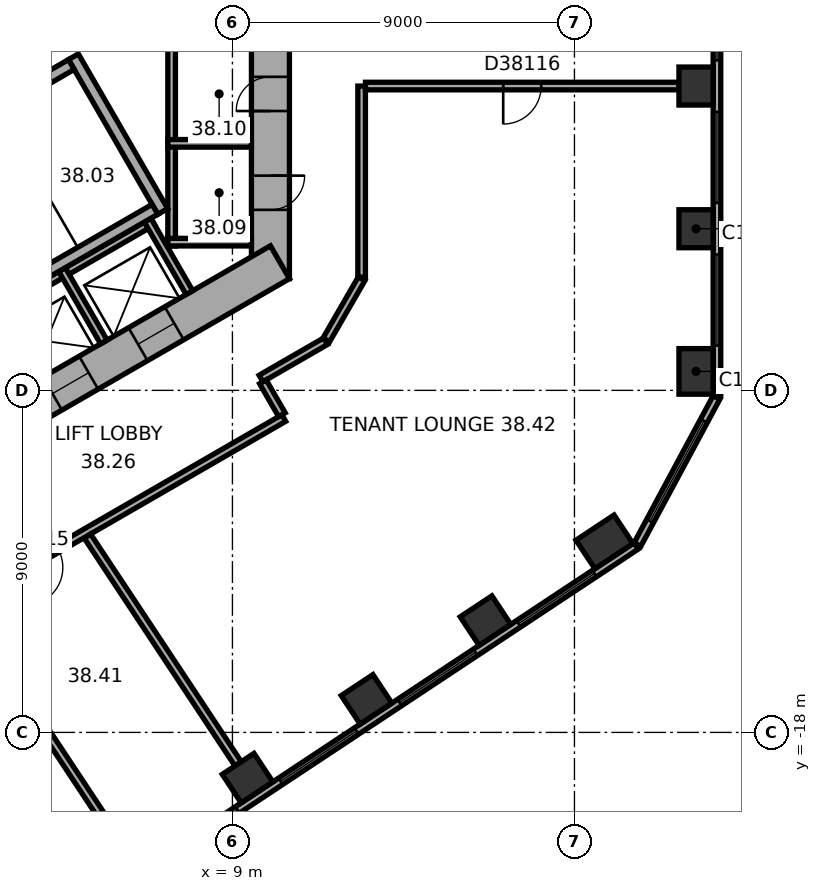
"""IFC4 building model, lengths in metres.
Left out: names, types, materials, properties, quantities, classifications, styles, units other than length and angle.
Written with IfcOpenShell. Run it as: python <this file> out.ifc"""

import sys

from ifc_helpers import new_model, si_unit, direction, frame, frame_2d, origin, origin_2d, place, context, subcontext, project, spatial, rectangle, extrude, element, fill, save


model = new_model("IFC4")
c1 = context("Model", 3, precision=1e-05, world=origin(), true_north=direction((0.0, 1.0)))
c2 = subcontext(c1, "Body", "Model", "MODEL_VIEW")
j1 = project(units=[si_unit("LENGTHUNIT", "METRE"), si_unit("PLANEANGLEUNIT", "RADIAN")], contexts=[c1])
p1 = place(None, origin())
s1 = spatial("IfcSite", under=j1, at=p1, CompositionType="ELEMENT")
p2 = place(p1, origin())
s2 = spatial("IfcBuilding", under=s1, at=p2, CompositionType="ELEMENT")
p3 = place(p2, frame((0.0, 0.0, 157.7)))
s3 = spatial("IfcBuildingStorey", under=s2, at=p3, CompositionType="ELEMENT", Elevation=157.7)
p4 = place(p3, frame((21.2, -8.501, 0.0), z_axis=(0.0, 0.0, 1.0), x_axis=(0.0, 1.0, 0.0)))
e1 = element("IfcColumn", 1, at=p4, inside=s3, PredefinedType="COLUMN", context=c2, shape_type="SweptSolid", body=[
    extrude(rectangle(XDim=1.2, YDim=0.9, at=origin_2d()), origin(), (0.0, 0.0, 1.0), 3.7),
])
for number, where, z_axis, x_axis in (
    (2, (21.2, -4.747, 0.0), (0.0, 0.0, 1.0), (0.0, 1.0, 0.0)),
    (3, (21.2, -0.993, 0.0), (0.0, 0.0, 1.0), (0.0, 1.0, 0.0)),
    (4, (9.398, -19.202, 0.0), (0.0, 0.0, 1.0), (0.834, 0.552, 0.0)),
    (5, (12.529, -17.13, 0.0), (0.0, 0.0, 1.0), (0.834, 0.552, 0.0)),
    (6, (15.659, -15.058, 0.0), (0.0, 0.0, 1.0), (0.834, 0.552, 0.0)),
):
    element("IfcColumn", number, at=place(p3, frame(where, z_axis=z_axis, x_axis=x_axis)), inside=s3, PredefinedType="COLUMN", context=c2, shape_type="SweptSolid", body=[
        extrude(rectangle(XDim=1.0, YDim=0.9, at=origin_2d()), origin(), (0.0, 0.0, 1.0), 3.7),
    ])
p5 = place(p3, frame((18.79, -12.986, 0.0), z_axis=(0.0, 0.0, 1.0), x_axis=(0.833885822067, 0.551936985312, 0.0)))
e7 = element("IfcColumn", 7, at=p5, inside=s3, PredefinedType="COLUMN", context=c2, shape_type="SweptSolid", body=[
    extrude(rectangle(XDim=1.2, YDim=0.9, at=origin_2d()), origin(), (0.0, 0.0, 1.0), 3.7),
])
p6 = place(p3, frame((10.0, -6.062, 0.0), z_axis=(0.0, 0.0, 1.0), x_axis=(0.0, 1.0, 0.0)))
e8 = element("IfcWall", 8, at=p6, inside=s3, PredefinedType="SHEAR", context=c2, shape_type="SweptSolid", body=[
    extrude(rectangle(XDim=12.125, YDim=1.0, at=frame_2d((6.062, 0.0))), origin(), (0.0, 0.0, 1.0), 3.7),
])
p7 = place(p6, frame((6.262, 0.0, 0.0)))
e9 = element("IfcOpeningElement", 9, at=p7, cuts=e8, PredefinedType="OPENING", context=c2, shape_type="SweptSolid", body=[
    extrude(rectangle(XDim=1.5, YDim=2.1, at=frame_2d((0.75, 1.05))), frame((0.0, 0.51, 0.0), z_axis=(0.0, -1.0, 0.0), x_axis=(1.0, 0.0, 0.0)), (0.0, 0.0, 1.0), 1.02),
])
p8 = place(p6, frame((1.812, 0.0, 0.0)))
e10 = element("IfcOpeningElement", 10, at=p8, cuts=e8, PredefinedType="OPENING", context=c2, shape_type="SweptSolid", body=[
    extrude(rectangle(XDim=0.9, YDim=2.1, at=frame_2d((0.45, 1.05))), frame((0.0, 0.51, 0.0), z_axis=(0.0, -1.0, 0.0), x_axis=(1.0, 0.0, 0.0)), (0.0, 0.0, 1.0), 1.02),
])
p9 = place(p6, frame((4.412, 0.0, 0.0)))
e11 = element("IfcOpeningElement", 11, at=p9, cuts=e8, PredefinedType="OPENING", context=c2, shape_type="SweptSolid", body=[
    extrude(rectangle(XDim=0.9, YDim=2.1, at=frame_2d((0.45, 1.05))), frame((0.0, 0.51, 0.0), z_axis=(0.0, -1.0, 0.0), x_axis=(1.0, 0.0, 0.0)), (0.0, 0.0, 1.0), 1.02),
])
p10 = place(p3, frame((-0.25, -11.691, 0.0), z_axis=(0.0, 0.0, 1.0), x_axis=(0.866022616891, 0.50000482701, 0.0)))
e12 = element("IfcWall", 12, at=p10, inside=s3, PredefinedType="SHEAR", context=c2, shape_type="SweptSolid", body=[
    extrude(rectangle(XDim=12.125, YDim=1.0, at=frame_2d((6.062, 0.0))), origin(), (0.0, 0.0, 1.0), 3.7),
])
p11 = place(p10, frame((2.612, 0.0, 0.0)))
e13 = element("IfcOpeningElement", 13, at=p11, cuts=e12, PredefinedType="OPENING", context=c2, shape_type="SweptSolid", body=[
    extrude(rectangle(XDim=1.1, YDim=2.1, at=frame_2d((0.55, 1.05))), frame((0.0, 0.51, 0.0), z_axis=(0.0, -1.0, 0.0), x_axis=(1.0, 0.0, 0.0)), (0.0, 0.0, 1.0), 1.02),
])
p12 = place(p10, frame((5.212, 0.0, 0.0)))
e14 = element("IfcOpeningElement", 14, at=p12, cuts=e12, PredefinedType="OPENING", context=c2, shape_type="SweptSolid", body=[
    extrude(rectangle(XDim=1.1, YDim=2.1, at=frame_2d((0.55, 1.05))), frame((0.0, 0.51, 0.0), z_axis=(0.0, -1.0, 0.0), x_axis=(1.0, 0.0, 0.0)), (0.0, 0.0, 1.0), 1.02),
])
p13 = place(p10, frame((7.812, 0.0, 0.0)))
e15 = element("IfcOpeningElement", 15, at=p13, cuts=e12, PredefinedType="OPENING", context=c2, shape_type="SweptSolid", body=[
    extrude(rectangle(XDim=1.1, YDim=2.1, at=frame_2d((0.55, 1.05))), frame((0.0, 0.51, 0.0), z_axis=(0.0, -1.0, 0.0), x_axis=(1.0, 0.0, 0.0)), (0.0, 0.0, 1.0), 1.02),
])
p14 = place(p3, frame((21.75, -9.138, 0.0), z_axis=(0.0, 0.0, 1.0), x_axis=(0.0, 1.0, 0.0)))
e16 = element("IfcWall", 16, at=p14, inside=s3, PredefinedType="STANDARD", context=c2, shape_type="SweptSolid", body=[
    extrude(rectangle(XDim=20.044, YDim=0.2, at=frame_2d((10.022, 0.0))), origin(), (0.0, 0.0, 1.0), 3.7),
])
p15 = place(p14, frame((1.314, 0.0, 0.9)))
e17 = element("IfcOpeningElement", 17, at=p15, cuts=e16, PredefinedType="OPENING", context=c2, shape_type="SweptSolid", body=[
    extrude(rectangle(XDim=2.4, YDim=2.0, at=frame_2d((1.2, 1.0))), frame((0.0, 0.11, 0.0), z_axis=(0.0, -1.0, 0.0), x_axis=(1.0, 0.0, 0.0)), (0.0, 0.0, 1.0), 0.22),
])
p16 = place(p14, frame((5.069, 0.0, 0.9)))
e18 = element("IfcOpeningElement", 18, at=p16, cuts=e16, PredefinedType="OPENING", context=c2, shape_type="SweptSolid", body=[
    extrude(rectangle(XDim=2.4, YDim=2.0, at=frame_2d((1.2, 1.0))), frame((0.0, 0.11, 0.0), z_axis=(0.0, -1.0, 0.0), x_axis=(1.0, 0.0, 0.0)), (0.0, 0.0, 1.0), 0.22),
])
p17 = place(p14, frame((8.823, 0.0, 0.9)))
e19 = element("IfcOpeningElement", 19, at=p17, cuts=e16, PredefinedType="OPENING", context=c2, shape_type="SweptSolid", body=[
    extrude(rectangle(XDim=2.4, YDim=2.0, at=frame_2d((1.2, 1.0))), frame((0.0, 0.11, 0.0), z_axis=(0.0, -1.0, 0.0), x_axis=(1.0, 0.0, 0.0)), (0.0, 0.0, 1.0), 0.22),
])
p18 = place(p14, frame((12.577, 0.0, 0.9)))
e20 = element("IfcOpeningElement", 20, at=p18, cuts=e16, PredefinedType="OPENING", context=c2, shape_type="SweptSolid", body=[
    extrude(rectangle(XDim=2.4, YDim=2.0, at=frame_2d((1.2, 1.0))), frame((0.0, 0.11, 0.0), z_axis=(0.0, -1.0, 0.0), x_axis=(1.0, 0.0, 0.0)), (0.0, 0.0, 1.0), 0.22),
])
p19 = place(p14, frame((16.331, 0.0, 0.9)))
e21 = element("IfcOpeningElement", 21, at=p19, cuts=e16, PredefinedType="OPENING", context=c2, shape_type="SweptSolid", body=[
    extrude(rectangle(XDim=2.4, YDim=2.0, at=frame_2d((1.2, 1.0))), frame((0.0, 0.11, 0.0), z_axis=(0.0, -1.0, 0.0), x_axis=(1.0, 0.0, 0.0)), (0.0, 0.0, 1.0), 0.22),
])
p20 = place(p3, frame((2.911, -24.156, 0.0), z_axis=(0.0, 0.0, 1.0), x_axis=(0.833882163564, 0.551942512668, 0.0)))
e22 = element("IfcWall", 22, at=p20, inside=s3, PredefinedType="STANDARD", context=c2, shape_type="SweptSolid", body=[
    extrude(rectangle(XDim=20.044, YDim=0.2, at=frame_2d((10.022, 0.0))), origin(), (0.0, 0.0, 1.0), 3.7),
])
p21 = place(p20, frame((1.313, 0.0, 0.9)))
e23 = element("IfcOpeningElement", 23, at=p21, cuts=e22, PredefinedType="OPENING", context=c2, shape_type="SweptSolid", body=[
    extrude(rectangle(XDim=2.4, YDim=2.0, at=frame_2d((1.2, 1.0))), frame((0.0, 0.11, 0.0), z_axis=(0.0, -1.0, 0.0), x_axis=(1.0, 0.0, 0.0)), (0.0, 0.0, 1.0), 0.22),
])
p22 = place(p20, frame((5.067, 0.0, 0.9)))
e24 = element("IfcOpeningElement", 24, at=p22, cuts=e22, PredefinedType="OPENING", context=c2, shape_type="SweptSolid", body=[
    extrude(rectangle(XDim=2.4, YDim=2.0, at=frame_2d((1.2, 1.0))), frame((0.0, 0.11, 0.0), z_axis=(0.0, -1.0, 0.0), x_axis=(1.0, 0.0, 0.0)), (0.0, 0.0, 1.0), 0.22),
])
p23 = place(p20, frame((8.821, 0.0, 0.9)))
e25 = element("IfcOpeningElement", 25, at=p23, cuts=e22, PredefinedType="OPENING", context=c2, shape_type="SweptSolid", body=[
    extrude(rectangle(XDim=2.4, YDim=2.0, at=frame_2d((1.2, 1.0))), frame((0.0, 0.11, 0.0), z_axis=(0.0, -1.0, 0.0), x_axis=(1.0, 0.0, 0.0)), (0.0, 0.0, 1.0), 0.22),
])
p24 = place(p20, frame((12.575, 0.0, 0.9)))
e26 = element("IfcOpeningElement", 26, at=p24, cuts=e22, PredefinedType="OPENING", context=c2, shape_type="SweptSolid", body=[
    extrude(rectangle(XDim=2.4, YDim=2.0, at=frame_2d((1.2, 1.0))), frame((0.0, 0.11, 0.0), z_axis=(0.0, -1.0, 0.0), x_axis=(1.0, 0.0, 0.0)), (0.0, 0.0, 1.0), 0.22),
])
p25 = place(p20, frame((16.329, 0.0, 0.9)))
e27 = element("IfcOpeningElement", 27, at=p25, cuts=e22, PredefinedType="OPENING", context=c2, shape_type="SweptSolid", body=[
    extrude(rectangle(XDim=2.4, YDim=2.0, at=frame_2d((1.2, 1.0))), frame((0.0, 0.11, 0.0), z_axis=(0.0, -1.0, 0.0), x_axis=(1.0, 0.0, 0.0)), (0.0, 0.0, 1.0), 0.22),
])
p26 = place(p3, frame((19.658, -13.057, 0.0), z_axis=(0.0, 0.0, 1.0), x_axis=(0.473307879841, 0.880897071672, 0.0)))
e28 = element("IfcWall", 28, at=p26, inside=s3, PredefinedType="STANDARD", context=c2, shape_type="SweptSolid", body=[
    extrude(rectangle(XDim=4.395, YDim=0.2, at=frame_2d((2.197, 0.0))), origin(), (0.0, 0.0, 1.0), 3.7),
])
p27 = place(p26, frame((0.698, 0.0, 0.9)))
e29 = element("IfcOpeningElement", 29, at=p27, cuts=e28, PredefinedType="OPENING", context=c2, shape_type="SweptSolid", body=[
    extrude(rectangle(XDim=3.0, YDim=2.0, at=frame_2d((1.5, 1.0))), frame((0.0, 0.11, 0.0), z_axis=(0.0, -1.0, 0.0), x_axis=(1.0, 0.0, 0.0)), (0.0, 0.0, 1.0), 0.22),
])
p28 = place(p3, frame((7.4, -5.2, 0.0), z_axis=(0.0, 0.0, 1.0), x_axis=(0.0, 1.0, 0.0)))
e30 = element("IfcWall", 30, at=p28, inside=s3, PredefinedType="PARTITIONING", context=c2, shape_type="SweptSolid", body=[
    extrude(rectangle(XDim=5.4, YDim=0.2, at=frame_2d((2.7, 0.0))), origin(), (0.0, 0.0, 1.0), 3.42),
])
for number, where, z_axis, x_axis in (
    (31, (7.3, -5.1, 0.0), (0.0, 0.0, 1.0), (1.0, 0.0, 0.0)),
    (32, (7.3, -2.5, 0.0), (0.0, 0.0, 1.0), (1.0, 0.0, 0.0)),
):
    element("IfcWall", number, at=place(p3, frame(where, z_axis=z_axis, x_axis=x_axis)), inside=s3, PredefinedType="PARTITIONING", context=c2, shape_type="SweptSolid", body=[
        extrude(rectangle(XDim=2.2, YDim=0.2, at=frame_2d((1.1, 0.0))), origin(), (0.0, 0.0, 1.0), 3.42),
    ])
p29 = place(p3, frame((-0.024, -8.559, 0.0), z_axis=(0.0, 0.0, 1.0), x_axis=(0.866026010844, 0.49999894854, 0.0)))
e33 = element("IfcWall", 33, at=p29, inside=s3, PredefinedType="PARTITIONING", context=c2, shape_type="SweptSolid", body=[
    extrude(rectangle(XDim=8.0, YDim=0.2, at=frame_2d((4.0, 0.0))), origin(), (0.0, 0.0, 1.0), 3.42),
])
for number, where, z_axis, x_axis in (
    (34, (4.516, -5.822, 0.0), (0.0, 0.0, 1.0), (0.5, -0.866, 0.0)),
    (35, (6.768, -4.522, 0.0), (0.0, 0.0, 1.0), (0.5, -0.866, 0.0)),
):
    element("IfcWall", number, at=place(p3, frame(where, z_axis=z_axis, x_axis=x_axis)), inside=s3, PredefinedType="PARTITIONING", context=c2, shape_type="SweptSolid", body=[
        extrude(rectangle(XDim=2.2, YDim=0.2, at=frame_2d((1.1, 0.0))), origin(), (0.0, 0.0, 1.0), 3.42),
    ])
p30 = place(p3, frame((4.816, -0.222, 0.0), z_axis=(0.0, 0.0, 1.0), x_axis=(0.499977259774, -0.866038532462, 0.0)))
e36 = element("IfcWall", 36, at=p30, inside=s3, PredefinedType="SHEAR", context=c2, shape_type="SweptSolid", body=[
    extrude(rectangle(XDim=4.7, YDim=0.3, at=frame_2d((2.35, 0.0))), origin(), (0.0, 0.0, 1.0), 3.42),
])
for number, where, z_axis, x_axis in (
    (37, (-1.353, -3.957, 0.0), (0.0, 0.0, 1.0), (0.866, 0.5, 0.0)),
    (38, (0.847, -7.767, 0.0), (0.0, 0.0, 1.0), (0.866, 0.5, 0.0)),
):
    element("IfcWall", number, at=place(p3, frame(where, z_axis=z_axis, x_axis=x_axis)), inside=s3, PredefinedType="SHEAR", context=c2, shape_type="SweptSolid", body=[
        extrude(rectangle(XDim=7.06, YDim=0.3, at=frame_2d((3.53, 0.0))), origin(), (0.0, 0.0, 1.0), 3.42),
    ])
p31 = place(p3, frame((2.816, -14.079, 0.0), z_axis=(0.0, 0.0, 1.0), x_axis=(0.866021128829, 0.500007404367, 0.0)))
e39 = element("IfcWall", 39, at=p31, inside=s3, PredefinedType="PARTITIONING", context=c2, shape_type="SweptSolid", body=[
    extrude(rectangle(XDim=8.702, YDim=0.2, at=frame_2d((4.351, 0.0))), origin(), (0.0, 0.0, 1.0), 3.42),
])
p32 = place(p31, frame((0.833, 0.0, 0.0)))
e40 = element("IfcOpeningElement", 40, at=p32, cuts=e39, PredefinedType="OPENING", context=c2, shape_type="SweptSolid", body=[
    extrude(rectangle(XDim=1.0, YDim=2.1, at=frame_2d((0.5, 1.05))), frame((0.0, 0.11, 0.0), z_axis=(0.0, -1.0, 0.0), x_axis=(1.0, 0.0, 0.0)), (0.0, 0.0, 1.0), 0.22),
])
p33 = place(p3, frame((6.02, -20.899, 0.0), z_axis=(0.0, 0.0, 1.0), x_axis=(-0.551943990108, 0.833881185651, 0.0)))
e41 = element("IfcWall", 41, at=p33, inside=s3, PredefinedType="PARTITIONING", context=c2, shape_type="SweptSolid", body=[
    extrude(rectangle(XDim=8.615, YDim=0.2, at=frame_2d((4.308, 0.0))), origin(), (0.0, 0.0, 1.0), 3.42),
])
p34 = place(p3, frame((9.15, -18.827, 0.0), z_axis=(0.0, 0.0, 1.0), x_axis=(-0.551928083938, 0.83389171369, 0.0)))
e42 = element("IfcWall", 42, at=p34, inside=s3, PredefinedType="PARTITIONING", context=c2, shape_type="SweptSolid", body=[
    extrude(rectangle(XDim=7.182, YDim=0.2, at=frame_2d((3.591, 0.0))), origin(), (0.0, 0.0, 1.0), 2.87),
])
p35 = place(p3, frame((9.752, -8.688, 0.0), z_axis=(0.0, 0.0, 1.0), x_axis=(0.865974105138, 0.500088841337, 0.0)))
e43 = element("IfcWall", 43, at=p35, inside=s3, PredefinedType="PARTITIONING", context=c2, shape_type="SweptSolid", body=[
    extrude(rectangle(XDim=1.961, YDim=0.2, at=frame_2d((0.98, 0.0))), origin(), (0.0, 0.0, 1.0), 3.42),
])
p36 = place(p3, frame((10.302, -9.642, 0.0), z_axis=(0.0, 0.0, 1.0), x_axis=(-0.500074377092, 0.865982457891, 0.0)))
e44 = element("IfcWall", 44, at=p36, inside=s3, PredefinedType="PARTITIONING", context=c2, shape_type="SweptSolid", body=[
    extrude(rectangle(XDim=1.001, YDim=0.2, at=frame_2d((0.5, 0.0))), origin(), (0.0, 0.0, 1.0), 3.42),
])
p37 = place(p3, frame((11.47, -7.673, 0.0), z_axis=(0.0, 0.0, 1.0), x_axis=(0.499964847546, 0.866045698112, 0.0)))
e45 = element("IfcWall", 45, at=p37, inside=s3, PredefinedType="PARTITIONING", context=c2, shape_type="SweptSolid", body=[
    extrude(rectangle(XDim=1.86, YDim=0.2, at=frame_2d((0.93, 0.0))), origin(), (0.0, 0.0, 1.0), 3.42),
])
p38 = place(p3, frame((12.4, -6.022, 0.0), z_axis=(0.0, 0.0, 1.0), x_axis=(0.0, 1.0, 0.0)))
e46 = element("IfcWall", 46, at=p38, inside=s3, PredefinedType="PARTITIONING", context=c2, shape_type="SweptSolid", body=[
    extrude(rectangle(XDim=5.029, YDim=0.2, at=frame_2d((2.515, 0.0))), origin(), (0.0, 0.0, 1.0), 3.42),
])
p39 = place(p3, frame((12.5, -0.993, 0.0), z_axis=(0.0, 0.0, 1.0), x_axis=(1.0, 0.0, 0.0)))
e47 = element("IfcWall", 47, at=p39, inside=s3, PredefinedType="PARTITIONING", context=c2, shape_type="SweptSolid", body=[
    extrude(rectangle(XDim=8.25, YDim=0.2, at=frame_2d((4.125, 0.0))), origin(), (0.0, 0.0, 1.0), 2.87),
])
p40 = place(p39, frame((3.625, 0.0, 0.0)))
e48 = element("IfcOpeningElement", 48, at=p40, cuts=e47, PredefinedType="OPENING", context=c2, shape_type="SweptSolid", body=[
    extrude(rectangle(XDim=1.0, YDim=2.1, at=frame_2d((0.5, 1.05))), frame((0.0, 0.11, 0.0), z_axis=(0.0, -1.0, 0.0), x_axis=(1.0, 0.0, 0.0)), (0.0, 0.0, 1.0), 0.22),
])
p41 = place(p15, origin())
e49 = element("IfcWindow", 49, at=p41, inside=s3, PartitioningType="SINGLE_PANEL", PredefinedType="WINDOW", context=c2, shape_type="SweptSolid", body=[
    extrude(rectangle(XDim=2.4, YDim=2.0, at=frame_2d((1.2, 1.0))), frame((0.0, 0.03, 0.0), z_axis=(0.0, -1.0, 0.0), x_axis=(1.0, 0.0, 0.0)), (0.0, 0.0, 1.0), 0.06),
])
fill(e17, e49)
p42 = place(p16, origin())
e50 = element("IfcWindow", 50, at=p42, inside=s3, PartitioningType="SINGLE_PANEL", PredefinedType="WINDOW", context=c2, shape_type="SweptSolid", body=[
    extrude(rectangle(XDim=2.4, YDim=2.0, at=frame_2d((1.2, 1.0))), frame((0.0, 0.03, 0.0), z_axis=(0.0, -1.0, 0.0), x_axis=(1.0, 0.0, 0.0)), (0.0, 0.0, 1.0), 0.06),
])
fill(e18, e50)
p43 = place(p17, origin())
e51 = element("IfcWindow", 51, at=p43, inside=s3, PartitioningType="SINGLE_PANEL", PredefinedType="WINDOW", context=c2, shape_type="SweptSolid", body=[
    extrude(rectangle(XDim=2.4, YDim=2.0, at=frame_2d((1.2, 1.0))), frame((0.0, 0.03, 0.0), z_axis=(0.0, -1.0, 0.0), x_axis=(1.0, 0.0, 0.0)), (0.0, 0.0, 1.0), 0.06),
])
fill(e19, e51)
p44 = place(p22, origin())
e52 = element("IfcWindow", 52, at=p44, inside=s3, PartitioningType="SINGLE_PANEL", PredefinedType="WINDOW", context=c2, shape_type="SweptSolid", body=[
    extrude(rectangle(XDim=2.4, YDim=2.0, at=frame_2d((1.2, 1.0))), frame((0.0, 0.03, 0.0), z_axis=(0.0, -1.0, 0.0), x_axis=(1.0, 0.0, 0.0)), (0.0, 0.0, 1.0), 0.06),
])
fill(e24, e52)
p45 = place(p23, origin())
e53 = element("IfcWindow", 53, at=p45, inside=s3, PartitioningType="SINGLE_PANEL", PredefinedType="WINDOW", context=c2, shape_type="SweptSolid", body=[
    extrude(rectangle(XDim=2.4, YDim=2.0, at=frame_2d((1.2, 1.0))), frame((0.0, 0.03, 0.0), z_axis=(0.0, -1.0, 0.0), x_axis=(1.0, 0.0, 0.0)), (0.0, 0.0, 1.0), 0.06),
])
fill(e25, e53)
p46 = place(p24, origin())
e54 = element("IfcWindow", 54, at=p46, inside=s3, PartitioningType="SINGLE_PANEL", PredefinedType="WINDOW", context=c2, shape_type="SweptSolid", body=[
    extrude(rectangle(XDim=2.4, YDim=2.0, at=frame_2d((1.2, 1.0))), frame((0.0, 0.03, 0.0), z_axis=(0.0, -1.0, 0.0), x_axis=(1.0, 0.0, 0.0)), (0.0, 0.0, 1.0), 0.06),
])
fill(e26, e54)
p47 = place(p25, origin())
e55 = element("IfcWindow", 55, at=p47, inside=s3, PartitioningType="SINGLE_PANEL", PredefinedType="WINDOW", context=c2, shape_type="SweptSolid", body=[
    extrude(rectangle(XDim=2.4, YDim=2.0, at=frame_2d((1.2, 1.0))), frame((0.0, 0.03, 0.0), z_axis=(0.0, -1.0, 0.0), x_axis=(1.0, 0.0, 0.0)), (0.0, 0.0, 1.0), 0.06),
])
fill(e27, e55)
p48 = place(p27, origin())
e56 = element("IfcWindow", 56, at=p48, inside=s3, PartitioningType="SINGLE_PANEL", PredefinedType="WINDOW", context=c2, shape_type="SweptSolid", body=[
    extrude(rectangle(XDim=3.0, YDim=2.0, at=frame_2d((1.5, 1.0))), frame((0.0, 0.03, 0.0), z_axis=(0.0, -1.0, 0.0), x_axis=(1.0, 0.0, 0.0)), (0.0, 0.0, 1.0), 0.06),
])
fill(e29, e56)
p49 = place(p8, origin())
e57 = element("IfcDoor", 57, at=p49, inside=s3, OperationType="SINGLE_SWING_LEFT", PredefinedType="DOOR", context=c2, shape_type="SweptSolid", body=[
    extrude(rectangle(XDim=0.9, YDim=2.1, at=frame_2d((0.45, 1.05))), frame((0.0, 0.025, 0.0), z_axis=(0.0, -1.0, 0.0), x_axis=(1.0, 0.0, 0.0)), (0.0, 0.0, 1.0), 0.05),
])
fill(e10, e57)
p50 = place(p9, origin())
e58 = element("IfcDoor", 58, at=p50, inside=s3, OperationType="SINGLE_SWING_LEFT", PredefinedType="DOOR", context=c2, shape_type="SweptSolid", body=[
    extrude(rectangle(XDim=0.9, YDim=2.1, at=frame_2d((0.45, 1.05))), frame((0.0, 0.025, 0.0), z_axis=(0.0, -1.0, 0.0), x_axis=(1.0, 0.0, 0.0)), (0.0, 0.0, 1.0), 0.05),
])
fill(e11, e58)
p51 = place(p12, origin())
e59 = element("IfcDoor", 59, at=p51, inside=s3, OperationType="DOUBLE_DOOR_SLIDING", PredefinedType="DOOR", context=c2, shape_type="SweptSolid", body=[
    extrude(rectangle(XDim=1.1, YDim=2.1, at=frame_2d((0.55, 1.05))), frame((0.0, 0.025, 0.0), z_axis=(0.0, -1.0, 0.0), x_axis=(1.0, 0.0, 0.0)), (0.0, 0.0, 1.0), 0.05),
])
fill(e14, e59)
p52 = place(p13, origin())
e60 = element("IfcDoor", 60, at=p52, inside=s3, OperationType="DOUBLE_DOOR_SLIDING", PredefinedType="DOOR", context=c2, shape_type="SweptSolid", body=[
    extrude(rectangle(XDim=1.1, YDim=2.1, at=frame_2d((0.55, 1.05))), frame((0.0, 0.025, 0.0), z_axis=(0.0, -1.0, 0.0), x_axis=(1.0, 0.0, 0.0)), (0.0, 0.0, 1.0), 0.05),
])
fill(e15, e60)
p53 = place(p32, origin())
e61 = element("IfcDoor", 61, at=p53, inside=s3, OperationType="SINGLE_SWING_LEFT", PredefinedType="DOOR", context=c2, shape_type="SweptSolid", body=[
    extrude(rectangle(XDim=1.0, YDim=2.1, at=frame_2d((0.5, 1.05))), frame((0.0, 0.025, 0.0), z_axis=(0.0, -1.0, 0.0), x_axis=(1.0, 0.0, 0.0)), (0.0, 0.0, 1.0), 0.05),
])
fill(e40, e61)
p54 = place(p40, origin())
e62 = element("IfcDoor", 62, at=p54, inside=s3, OperationType="SINGLE_SWING_LEFT", PredefinedType="DOOR", context=c2, shape_type="SweptSolid", body=[
    extrude(rectangle(XDim=1.0, YDim=2.1, at=frame_2d((0.5, 1.05))), frame((0.0, 0.025, 0.0), z_axis=(0.0, -1.0, 0.0), x_axis=(1.0, 0.0, 0.0)), (0.0, 0.0, 1.0), 0.05),
])
fill(e48, e62)
save(model, sys.argv[1])
